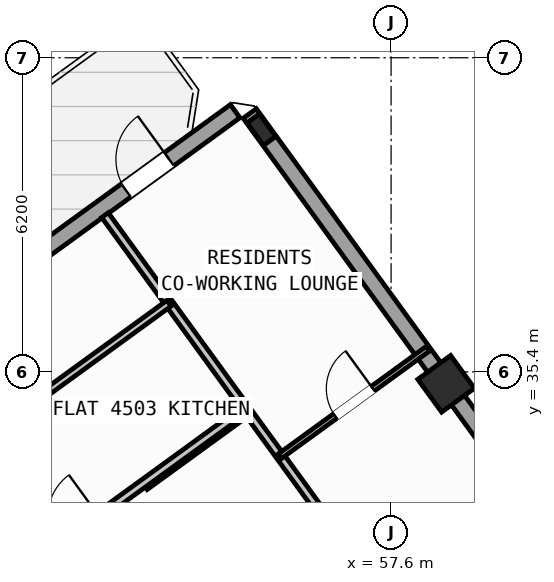
"""IFC4 building model, lengths in metres.
Left out: names, types, materials, properties, quantities, classifications, styles, units other than length and angle.
Written with IfcOpenShell. Run it as: python <this file> out.ifc"""

import sys

from ifc_helpers import new_model, si_unit, direction, frame, frame_2d, origin, origin_2d, place, context, subcontext, project, spatial, rectangle, hollow_rectangle, i_section, extrude, source, transform, mapped, element, fill, save


model = new_model("IFC4")
c1 = context("Model", 3, precision=1e-05, world=origin(), true_north=direction((0.0, 1.0)))
c2 = subcontext(c1, "Body", "Model", "MODEL_VIEW")
j1 = project(units=[si_unit("LENGTHUNIT", "METRE"), si_unit("PLANEANGLEUNIT", "RADIAN")], contexts=[c1])
p1 = place(None, origin())
s1 = spatial("IfcSite", under=j1, at=p1, CompositionType="ELEMENT")
p2 = place(p1, origin())
s2 = spatial("IfcBuilding", under=s1, at=p2, CompositionType="ELEMENT")
p3 = place(p2, frame((0.0, 0.0, 179.4)))
s3 = spatial("IfcBuildingStorey", under=s2, at=p3, CompositionType="ELEMENT", Elevation=179.4)
m1 = source(origin(), c2, "Body", "SweptSolid", [
    extrude(hollow_rectangle(XDim=0.8, YDim=0.8, WallThickness=0.032, at=origin_2d()), origin(), (0.0, 0.0, 1.0), 4.8),
])
p4 = place(p3, frame((58.686, 35.165, 0.0), z_axis=(0.0, 0.0, 1.0), x_axis=(0.809016994375, 0.587785252292, 0.0)))
e1 = element("IfcColumn", 1, at=p4, inside=s3, PredefinedType="COLUMN", context=c2, shape_type="MappedRepresentation", body=[
    mapped(m1, transform((0.0, 0.0, 0.0), scale=1.0)),
])
m2 = source(origin(), c2, "Body", "SweptSolid", [
    extrude(i_section(OverallWidth=0.3, OverallDepth=0.55, WebThickness=0.015, FlangeThickness=0.029, at=origin_2d()), origin(), (0.0, 0.0, 1.0), 4.8),
])
p5 = place(p3, frame((55.042, 40.181, 0.0), z_axis=(0.0, 0.0, 1.0), x_axis=(0.809016994375, 0.587785252292, 0.0)))
e2 = element("IfcColumn", 2, at=p5, inside=s3, PredefinedType="COLUMN", context=c2, shape_type="MappedRepresentation", body=[
    mapped(m2, transform((0.0, 0.0, 0.0), scale=1.0)),
])
p6 = place(p3, frame((42.207, 31.597, 0.0), z_axis=(0.0, 0.0, 1.0), x_axis=(0.809020333377, 0.587780656523, 0.0)))
e3 = element("IfcWall", 3, at=p6, inside=s3, PredefinedType="STANDARD", context=c2, shape_type="SweptSolid", body=[
    extrude(rectangle(XDim=15.223, YDim=0.32, at=frame_2d((7.611, 0.0))), origin(), (0.0, 0.0, 1.0), 4.55),
])
p7 = place(p6, frame((12.562, 0.0, 0.0)))
e4 = element("IfcOpeningElement", 4, at=p7, cuts=e3, PredefinedType="OPENING", context=c2, shape_type="SweptSolid", body=[
    extrude(rectangle(XDim=1.05, YDim=2.15, at=frame_2d((0.525, 1.075))), frame((0.0, 0.17, 0.0), z_axis=(0.0, -1.0, 0.0), x_axis=(1.0, 0.0, 0.0)), (0.0, 0.0, 1.0), 0.34),
])
p8 = place(p6, frame((2.97, 0.0, 0.75)))
e5 = element("IfcOpeningElement", 5, at=p8, cuts=e3, PredefinedType="OPENING", context=c2, shape_type="SweptSolid", body=[
    extrude(rectangle(XDim=2.4, YDim=1.6, at=frame_2d((1.2, 0.8))), frame((0.0, 0.17, 0.0), z_axis=(0.0, -1.0, 0.0), x_axis=(1.0, 0.0, 0.0)), (0.0, 0.0, 1.0), 0.34),
])
p9 = place(p3, frame((54.81, 40.5, 0.0), z_axis=(0.0, 0.0, 1.0), x_axis=(0.587783625747, -0.809018176127, 0.0)))
e6 = element("IfcWall", 6, at=p9, inside=s3, PredefinedType="STANDARD", context=c2, shape_type="SweptSolid", body=[
    extrude(rectangle(XDim=21.587, YDim=0.32, at=frame_2d((10.794, 0.0))), origin(), (0.0, 0.0, 1.0), 4.025),
])
p10 = place(p9, frame((9.061, 0.0, 0.75)))
e7 = element("IfcOpeningElement", 7, at=p10, cuts=e6, PredefinedType="OPENING", context=c2, shape_type="SweptSolid", body=[
    extrude(rectangle(XDim=2.4, YDim=1.6, at=frame_2d((1.2, 0.8))), frame((0.0, 0.17, 0.0), z_axis=(0.0, -1.0, 0.0), x_axis=(1.0, 0.0, 0.0)), (0.0, 0.0, 1.0), 0.34),
])
p11 = place(p9, frame((18.184, 0.0, 0.85)))
e8 = element("IfcOpeningElement", 8, at=p11, cuts=e6, PredefinedType="OPENING", context=c2, shape_type="SweptSolid", body=[
    extrude(rectangle(XDim=1.8, YDim=1.5, at=frame_2d((0.9, 0.75))), frame((0.0, 0.17, 0.0), z_axis=(0.0, -1.0, 0.0), x_axis=(1.0, 0.0, 0.0)), (0.0, 0.0, 1.0), 0.34),
])
p12 = place(p3, frame((52.739, 33.143, 0.0), z_axis=(0.0, 0.0, 1.0), x_axis=(0.809000999347, 0.58780726693, 0.0)))
e9 = element("IfcWall", 9, at=p12, inside=s3, PredefinedType="PARTITIONING", context=c2, shape_type="SweptSolid", body=[
    extrude(rectangle(XDim=2.51, YDim=0.16, at=frame_2d((1.255, 0.0))), origin(), (0.0, 0.0, 1.0), 4.54),
])
p13 = place(p3, frame((60.829, 26.278, 0.0), z_axis=(0.0, 0.0, 1.0), x_axis=(-0.587777474174, 0.809022645451, 0.0)))
e10 = element("IfcWall", 10, at=p13, inside=s3, PredefinedType="PARTITIONING", context=c2, shape_type="SweptSolid", body=[
    extrude(rectangle(XDim=15.1, YDim=0.16, at=frame_2d((7.55, 0.0))), origin(), (0.0, 0.0, 1.0), 4.54),
])
p14 = place(p3, frame((55.409, 33.738, 0.0), z_axis=(0.0, 0.0, 1.0), x_axis=(0.809005039917, 0.58780170584, 0.0)))
e11 = element("IfcWall", 11, at=p14, inside=s3, PredefinedType="PARTITIONING", context=c2, shape_type="SweptSolid", body=[
    extrude(rectangle(XDim=3.61, YDim=0.11, at=frame_2d((1.805, 0.0))), origin(), (0.0, 0.0, 1.0), 4.54),
])
p15 = place(p14, frame((1.345, 0.0, 0.0)))
e12 = element("IfcOpeningElement", 12, at=p15, cuts=e11, PredefinedType="OPENING", context=c2, shape_type="SweptSolid", body=[
    extrude(rectangle(XDim=0.92, YDim=2.08, at=frame_2d((0.46, 1.04))), frame((0.0, 0.065, 0.0), z_axis=(0.0, -1.0, 0.0), x_axis=(1.0, 0.0, 0.0)), (0.0, 0.0, 1.0), 0.13),
])
p16 = place(p3, frame((42.866, 26.044, 0.0), z_axis=(0.0, 0.0, 1.0), x_axis=(0.809020254154, 0.587780765566, 0.0)))
e13 = element("IfcWall", 13, at=p16, inside=s3, PredefinedType="PARTITIONING", context=c2, shape_type="SweptSolid", body=[
    extrude(rectangle(XDim=14.67, YDim=0.16, at=frame_2d((7.335, 0.0))), origin(), (0.0, 0.0, 1.0), 4.54),
])
p17 = place(p16, frame((10.08, 0.0, 0.0)))
e14 = element("IfcOpeningElement", 14, at=p17, cuts=e13, PredefinedType="OPENING", context=c2, shape_type="SweptSolid", body=[
    extrude(rectangle(XDim=1.0, YDim=2.1, at=frame_2d((0.5, 1.05))), frame((0.0, 0.09, 0.0), z_axis=(0.0, -1.0, 0.0), x_axis=(1.0, 0.0, 0.0)), (0.0, 0.0, 1.0), 0.18),
])
p18 = place(p3, frame((42.377, 28.878, 0.0), z_axis=(0.0, 0.0, 1.0), x_axis=(0.809020411523, 0.587780548963, 0.0)))
e15 = element("IfcWall", 15, at=p18, inside=s3, PredefinedType="PLUMBINGWALL", context=c2, shape_type="SweptSolid", body=[
    extrude(rectangle(XDim=13.4, YDim=0.14, at=frame_2d((6.7, 0.0))), origin(), (0.0, 0.0, 1.0), 4.54),
])
p19 = place(p18, frame((8.82, 0.0, 0.0)))
e16 = element("IfcOpeningElement", 16, at=p19, cuts=e15, PredefinedType="OPENING", context=c2, shape_type="SweptSolid", body=[
    extrude(rectangle(XDim=0.92, YDim=2.08, at=frame_2d((0.46, 1.04))), frame((0.0, 0.08, 0.0), z_axis=(0.0, -1.0, 0.0), x_axis=(1.0, 0.0, 0.0)), (0.0, 0.0, 1.0), 0.16),
])
m3 = source(origin(), c2, "Body", "SweptSolid", [
    extrude(rectangle(XDim=1.05, YDim=2.15, at=frame_2d((0.525, 1.075))), frame((0.0, 0.025, 0.0), z_axis=(0.0, -1.0, 0.0), x_axis=(1.0, 0.0, 0.0)), (0.0, 0.0, 1.0), 0.05),
])
p20 = place(p7, origin())
e17 = element("IfcDoor", 17, at=p20, inside=s3, OperationType="SINGLE_SWING_RIGHT", PredefinedType="DOOR", context=c2, shape_type="MappedRepresentation", body=[
    mapped(m3, transform((0.0, 0.0, 0.0), scale=1.0)),
])
fill(e4, e17)
m4 = source(origin(), c2, "Body", "SweptSolid", [
    extrude(rectangle(XDim=0.92, YDim=2.08, at=frame_2d((0.46, 1.04))), frame((0.0, 0.025, 0.0), z_axis=(0.0, -1.0, 0.0), x_axis=(1.0, 0.0, 0.0)), (0.0, 0.0, 1.0), 0.05),
])
p21 = place(p15, origin())
e18 = element("IfcDoor", 18, at=p21, inside=s3, OperationType="SINGLE_SWING_RIGHT", PredefinedType="DOOR", context=c2, shape_type="MappedRepresentation", body=[
    mapped(m4, transform((0.0, 0.0, 0.0), scale=1.0)),
])
fill(e12, e18)
save(model, sys.argv[1])
